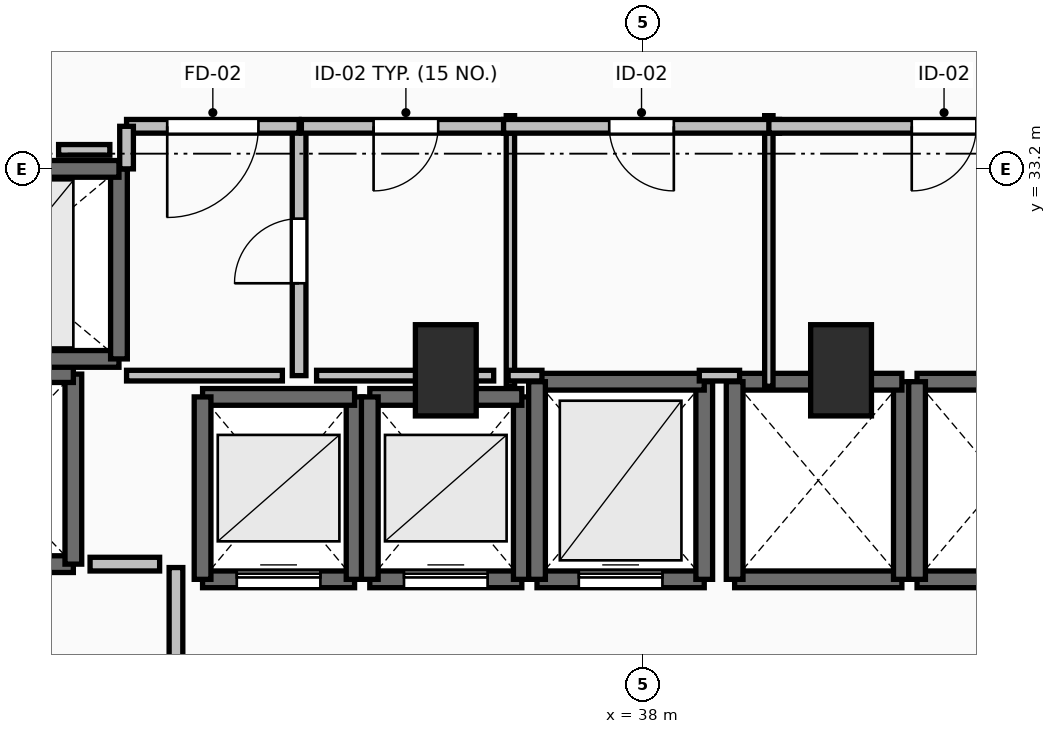
"""IFC4 building model, lengths in metres.
Left out: names, types, materials, properties, quantities, classifications, styles, units other than length and angle.
Written with IfcOpenShell. Run it as: python <this file> out.ifc"""

import sys

from ifc_helpers import new_model, si_unit, direction, frame, frame_2d, origin, origin_2d, place, context, subcontext, project, spatial, rectangle, extrude, element, fill, save


model = new_model("IFC4")
c1 = context("Model", 3, precision=1e-05, world=origin(), true_north=direction((0.0, 1.0)))
c2 = subcontext(c1, "Body", "Model", "MODEL_VIEW")
j1 = project(units=[si_unit("LENGTHUNIT", "METRE"), si_unit("PLANEANGLEUNIT", "RADIAN")], contexts=[c1])
p1 = place(None, origin())
s1 = spatial("IfcSite", under=j1, at=p1, CompositionType="ELEMENT")
p2 = place(p1, origin())
s2 = spatial("IfcBuilding", under=s1, at=p2, CompositionType="ELEMENT")
p3 = place(p2, frame((0.0, 0.0, 106.8)))
s3 = spatial("IfcBuildingStorey", under=s2, at=p3, CompositionType="ELEMENT", Elevation=106.8)
for number, where, z_axis, x_axis in (
    (1, (35.4, 30.55, 0.0), (0.0, 0.0, 1.0), (1.0, 0.0, 0.0)),
    (2, (40.6, 30.55, 0.0), (0.0, 0.0, 1.0), (1.0, 0.0, 0.0)),
):
    element("IfcColumn", number, at=place(p3, frame(where, z_axis=z_axis, x_axis=x_axis)), inside=s3, PredefinedType="PILASTER", context=c2, shape_type="SweptSolid", body=[
        extrude(rectangle(XDim=0.8, YDim=1.2, at=origin_2d()), origin(), (0.0, 0.0, 1.0), 3.5),
    ])
p4 = place(p3, frame((32.2, 27.8, 0.0), z_axis=(0.0, 0.0, 1.0), x_axis=(1.0, 0.0, 0.0)))
e3 = element("IfcWall", 3, at=p4, inside=s3, PredefinedType="SOLIDWALL", context=c2, shape_type="SweptSolid", body=[
    extrude(rectangle(XDim=2.0, YDim=0.22, at=frame_2d((1.0, 0.0))), origin(), (0.0, 0.0, 1.0), 3.24),
])
p5 = place(p4, frame((0.45, 0.0, 0.0)))
e4 = element("IfcOpeningElement", 4, at=p5, cuts=e3, PredefinedType="OPENING", context=c2, shape_type="SweptSolid", body=[
    extrude(rectangle(XDim=1.1, YDim=2.2, at=frame_2d((0.55, 1.1))), frame((0.0, 0.125, 0.0), z_axis=(0.0, -1.0, 0.0), x_axis=(1.0, 0.0, 0.0)), (0.0, 0.0, 1.0), 0.25),
])
p6 = place(p3, frame((34.2, 27.8, 0.0), z_axis=(0.0, 0.0, 1.0), x_axis=(0.0, 1.0, 0.0)))
e5 = element("IfcWall", 5, at=p6, inside=s3, PredefinedType="SOLIDWALL", context=c2, shape_type="SweptSolid", body=[
    extrude(rectangle(XDim=2.4, YDim=0.22, at=frame_2d((1.2, 0.0))), origin(), (0.0, 0.0, 1.0), 3.24),
])
p7 = place(p3, frame((34.2, 30.2, 0.0), z_axis=(0.0, 0.0, 1.0), x_axis=(-1.0, 0.0, 0.0)))
e6 = element("IfcWall", 6, at=p7, inside=s3, PredefinedType="SOLIDWALL", context=c2, shape_type="SweptSolid", body=[
    extrude(rectangle(XDim=2.0, YDim=0.22, at=frame_2d((1.0, 0.0))), origin(), (0.0, 0.0, 1.0), 3.24),
])
p8 = place(p3, frame((32.2, 30.2, 0.0), z_axis=(0.0, 0.0, 1.0), x_axis=(0.0, -1.0, 0.0)))
e7 = element("IfcWall", 7, at=p8, inside=s3, PredefinedType="SOLIDWALL", context=c2, shape_type="SweptSolid", body=[
    extrude(rectangle(XDim=2.4, YDim=0.22, at=frame_2d((1.2, 0.0))), origin(), (0.0, 0.0, 1.0), 3.24),
])
p9 = place(p3, frame((34.4, 27.8, 0.0), z_axis=(0.0, 0.0, 1.0), x_axis=(1.0, 0.0, 0.0)))
e8 = element("IfcWall", 8, at=p9, inside=s3, PredefinedType="SOLIDWALL", context=c2, shape_type="SweptSolid", body=[
    extrude(rectangle(XDim=2.0, YDim=0.22, at=frame_2d((1.0, 0.0))), origin(), (0.0, 0.0, 1.0), 3.24),
])
p10 = place(p9, frame((0.45, 0.0, 0.0)))
e9 = element("IfcOpeningElement", 9, at=p10, cuts=e8, PredefinedType="OPENING", context=c2, shape_type="SweptSolid", body=[
    extrude(rectangle(XDim=1.1, YDim=2.2, at=frame_2d((0.55, 1.1))), frame((0.0, 0.125, 0.0), z_axis=(0.0, -1.0, 0.0), x_axis=(1.0, 0.0, 0.0)), (0.0, 0.0, 1.0), 0.25),
])
p11 = place(p3, frame((36.4, 27.8, 0.0), z_axis=(0.0, 0.0, 1.0), x_axis=(0.0, 1.0, 0.0)))
e10 = element("IfcWall", 10, at=p11, inside=s3, PredefinedType="SOLIDWALL", context=c2, shape_type="SweptSolid", body=[
    extrude(rectangle(XDim=2.4, YDim=0.22, at=frame_2d((1.2, 0.0))), origin(), (0.0, 0.0, 1.0), 3.24),
])
p12 = place(p3, frame((36.4, 30.2, 0.0), z_axis=(0.0, 0.0, 1.0), x_axis=(-1.0, 0.0, 0.0)))
e11 = element("IfcWall", 11, at=p12, inside=s3, PredefinedType="SOLIDWALL", context=c2, shape_type="SweptSolid", body=[
    extrude(rectangle(XDim=2.0, YDim=0.22, at=frame_2d((1.0, 0.0))), origin(), (0.0, 0.0, 1.0), 3.24),
])
p13 = place(p3, frame((34.4, 30.2, 0.0), z_axis=(0.0, 0.0, 1.0), x_axis=(0.0, -1.0, 0.0)))
e12 = element("IfcWall", 12, at=p13, inside=s3, PredefinedType="SOLIDWALL", context=c2, shape_type="SweptSolid", body=[
    extrude(rectangle(XDim=2.4, YDim=0.22, at=frame_2d((1.2, 0.0))), origin(), (0.0, 0.0, 1.0), 3.24),
])
p14 = place(p3, frame((36.6, 27.8, 0.0), z_axis=(0.0, 0.0, 1.0), x_axis=(1.0, 0.0, 0.0)))
e13 = element("IfcWall", 13, at=p14, inside=s3, PredefinedType="SOLIDWALL", context=c2, shape_type="SweptSolid", body=[
    extrude(rectangle(XDim=2.2, YDim=0.22, at=frame_2d((1.1, 0.0))), origin(), (0.0, 0.0, 1.0), 3.24),
])
p15 = place(p14, frame((0.55, 0.0, 0.0)))
e14 = element("IfcOpeningElement", 14, at=p15, cuts=e13, PredefinedType="OPENING", context=c2, shape_type="SweptSolid", body=[
    extrude(rectangle(XDim=1.1, YDim=2.2, at=frame_2d((0.55, 1.1))), frame((0.0, 0.125, 0.0), z_axis=(0.0, -1.0, 0.0), x_axis=(1.0, 0.0, 0.0)), (0.0, 0.0, 1.0), 0.25),
])
p16 = place(p3, frame((38.8, 27.8, 0.0), z_axis=(0.0, 0.0, 1.0), x_axis=(0.0, 1.0, 0.0)))
e15 = element("IfcWall", 15, at=p16, inside=s3, PredefinedType="SOLIDWALL", context=c2, shape_type="SweptSolid", body=[
    extrude(rectangle(XDim=2.6, YDim=0.22, at=frame_2d((1.3, 0.0))), origin(), (0.0, 0.0, 1.0), 3.24),
])
p17 = place(p3, frame((38.8, 30.4, 0.0), z_axis=(0.0, 0.0, 1.0), x_axis=(-1.0, 0.0, 0.0)))
e16 = element("IfcWall", 16, at=p17, inside=s3, PredefinedType="SOLIDWALL", context=c2, shape_type="SweptSolid", body=[
    extrude(rectangle(XDim=2.2, YDim=0.22, at=frame_2d((1.1, 0.0))), origin(), (0.0, 0.0, 1.0), 3.24),
])
p18 = place(p3, frame((36.6, 30.4, 0.0), z_axis=(0.0, 0.0, 1.0), x_axis=(0.0, -1.0, 0.0)))
e17 = element("IfcWall", 17, at=p18, inside=s3, PredefinedType="SOLIDWALL", context=c2, shape_type="SweptSolid", body=[
    extrude(rectangle(XDim=2.6, YDim=0.22, at=frame_2d((1.3, 0.0))), origin(), (0.0, 0.0, 1.0), 3.24),
])
p19 = place(p3, frame((39.2, 27.8, 0.0), z_axis=(0.0, 0.0, 1.0), x_axis=(1.0, 0.0, 0.0)))
e18 = element("IfcWall", 18, at=p19, inside=s3, PredefinedType="SOLIDWALL", context=c2, shape_type="SweptSolid", body=[
    extrude(rectangle(XDim=2.2, YDim=0.22, at=frame_2d((1.1, 0.0))), origin(), (0.0, 0.0, 1.0), 3.24),
])
p20 = place(p3, frame((41.4, 27.8, 0.0), z_axis=(0.0, 0.0, 1.0), x_axis=(0.0, 1.0, 0.0)))
e19 = element("IfcWall", 19, at=p20, inside=s3, PredefinedType="SOLIDWALL", context=c2, shape_type="SweptSolid", body=[
    extrude(rectangle(XDim=2.6, YDim=0.22, at=frame_2d((1.3, 0.0))), origin(), (0.0, 0.0, 1.0), 3.24),
])
p21 = place(p3, frame((41.4, 30.4, 0.0), z_axis=(0.0, 0.0, 1.0), x_axis=(-1.0, 0.0, 0.0)))
e20 = element("IfcWall", 20, at=p21, inside=s3, PredefinedType="SOLIDWALL", context=c2, shape_type="SweptSolid", body=[
    extrude(rectangle(XDim=2.2, YDim=0.22, at=frame_2d((1.1, 0.0))), origin(), (0.0, 0.0, 1.0), 3.24),
])
p22 = place(p3, frame((39.2, 30.4, 0.0), z_axis=(0.0, 0.0, 1.0), x_axis=(0.0, -1.0, 0.0)))
e21 = element("IfcWall", 21, at=p22, inside=s3, PredefinedType="SOLIDWALL", context=c2, shape_type="SweptSolid", body=[
    extrude(rectangle(XDim=2.6, YDim=0.22, at=frame_2d((1.3, 0.0))), origin(), (0.0, 0.0, 1.0), 3.24),
])
for number, where, z_axis, x_axis in (
    (22, (41.6, 27.8, 0.0), (0.0, 0.0, 1.0), (1.0, 0.0, 0.0)),
    (23, (43.8, 30.4, 0.0), (0.0, 0.0, 1.0), (-1.0, 0.0, 0.0)),
):
    element("IfcWall", number, at=place(p3, frame(where, z_axis=z_axis, x_axis=x_axis)), inside=s3, PredefinedType="SOLIDWALL", context=c2, shape_type="SweptSolid", body=[
        extrude(rectangle(XDim=2.2, YDim=0.22, at=frame_2d((1.1, 0.0))), origin(), (0.0, 0.0, 1.0), 3.24),
    ])
p23 = place(p3, frame((41.6, 30.4, 0.0), z_axis=(0.0, 0.0, 1.0), x_axis=(0.0, -1.0, 0.0)))
e24 = element("IfcWall", 24, at=p23, inside=s3, PredefinedType="SOLIDWALL", context=c2, shape_type="SweptSolid", body=[
    extrude(rectangle(XDim=2.6, YDim=0.22, at=frame_2d((1.3, 0.0))), origin(), (0.0, 0.0, 1.0), 3.24),
])
p24 = place(p3, frame((28.1, 28.0, 0.0), z_axis=(0.0, 0.0, 1.0), x_axis=(1.0, 0.0, 0.0)))
e25 = element("IfcWall", 25, at=p24, inside=s3, PredefinedType="SHEAR", context=c2, shape_type="SweptSolid", body=[
    extrude(rectangle(XDim=2.4, YDim=0.22, at=frame_2d((1.2, 0.0))), origin(), (0.0, 0.0, 1.0), 3.24),
])
p25 = place(p24, frame((0.6, 0.0, 0.0)))
e26 = element("IfcOpeningElement", 26, at=p25, cuts=e25, PredefinedType="OPENING", context=c2, shape_type="SweptSolid", body=[
    extrude(rectangle(XDim=1.2, YDim=2.2, at=frame_2d((0.6, 1.1))), frame((0.0, 0.125, 0.0), z_axis=(0.0, -1.0, 0.0), x_axis=(1.0, 0.0, 0.0)), (0.0, 0.0, 1.0), 0.25),
])
p26 = place(p3, frame((30.5, 28.0, 0.0), z_axis=(0.0, 0.0, 1.0), x_axis=(0.0, 1.0, 0.0)))
e27 = element("IfcWall", 27, at=p26, inside=s3, PredefinedType="SHEAR", context=c2, shape_type="SweptSolid", body=[
    extrude(rectangle(XDim=2.5, YDim=0.22, at=frame_2d((1.25, 0.0))), origin(), (0.0, 0.0, 1.0), 3.24),
])
p27 = place(p3, frame((30.5, 30.5, 0.0), z_axis=(0.0, 0.0, 1.0), x_axis=(-1.0, 0.0, 0.0)))
e28 = element("IfcWall", 28, at=p27, inside=s3, PredefinedType="SHEAR", context=c2, shape_type="SweptSolid", body=[
    extrude(rectangle(XDim=2.4, YDim=0.22, at=frame_2d((1.2, 0.0))), origin(), (0.0, 0.0, 1.0), 3.24),
])
p28 = place(p3, frame((28.1, 30.7, 0.0), z_axis=(0.0, 0.0, 1.0), x_axis=(1.0, 0.0, 0.0)))
e29 = element("IfcWall", 29, at=p28, inside=s3, PredefinedType="SOLIDWALL", context=c2, shape_type="SweptSolid", body=[
    extrude(rectangle(XDim=3.0, YDim=0.22, at=frame_2d((1.5, 0.0))), origin(), (0.0, 0.0, 1.0), 3.24),
])
p29 = place(p3, frame((31.1, 30.7, 0.0), z_axis=(0.0, 0.0, 1.0), x_axis=(0.0, 1.0, 0.0)))
e30 = element("IfcWall", 30, at=p29, inside=s3, PredefinedType="SOLIDWALL", context=c2, shape_type="SweptSolid", body=[
    extrude(rectangle(XDim=2.5, YDim=0.22, at=frame_2d((1.25, 0.0))), origin(), (0.0, 0.0, 1.0), 3.24),
])
p30 = place(p3, frame((31.1, 33.2, 0.0), z_axis=(0.0, 0.0, 1.0), x_axis=(-1.0, 0.0, 0.0)))
e31 = element("IfcWall", 31, at=p30, inside=s3, PredefinedType="SOLIDWALL", context=c2, shape_type="SweptSolid", body=[
    extrude(rectangle(XDim=3.0, YDim=0.22, at=frame_2d((1.5, 0.0))), origin(), (0.0, 0.0, 1.0), 3.24),
])
p31 = place(p30, frame((0.9, 0.0, 0.0)))
e32 = element("IfcOpeningElement", 32, at=p31, cuts=e31, PredefinedType="OPENING", context=c2, shape_type="SweptSolid", body=[
    extrude(rectangle(XDim=1.2, YDim=2.2, at=frame_2d((0.6, 1.1))), frame((0.0, 0.125, 0.0), z_axis=(0.0, -1.0, 0.0), x_axis=(1.0, 0.0, 0.0)), (0.0, 0.0, 1.0), 0.25),
])
p32 = place(p3, frame((31.85, 24.045, 0.0), z_axis=(0.0, 0.0, 1.0), x_axis=(0.0, 1.0, 0.0)))
e33 = element("IfcWall", 33, at=p32, inside=s3, PredefinedType="PARTITIONING", context=c2, shape_type="SweptSolid", body=[
    extrude(rectangle(XDim=3.91, YDim=0.18, at=frame_2d((1.955, 0.0))), origin(), (0.0, 0.0, 1.0), 3.24),
])
p33 = place(p32, frame((1.355, 0.0, 0.0)))
e34 = element("IfcOpeningElement", 34, at=p33, cuts=e33, PredefinedType="OPENING", context=c2, shape_type="SweptSolid", body=[
    extrude(rectangle(XDim=1.2, YDim=2.15, at=frame_2d((0.6, 1.075))), frame((0.0, 0.105, 0.0), z_axis=(0.0, -1.0, 0.0), x_axis=(1.0, 0.0, 0.0)), (0.0, 0.0, 1.0), 0.21),
])
p34 = place(p3, frame((33.47, 30.48, 0.0), z_axis=(0.0, 0.0, 1.0), x_axis=(0.0, 1.0, 0.0)))
e35 = element("IfcWall", 35, at=p34, inside=s3, PredefinedType="PARTITIONING", context=c2, shape_type="SweptSolid", body=[
    extrude(rectangle(XDim=3.28, YDim=0.18, at=frame_2d((1.64, 0.0))), origin(), (0.0, 0.0, 1.0), 3.24),
])
p35 = place(p34, frame((1.215, 0.0, 0.0)))
e36 = element("IfcOpeningElement", 36, at=p35, cuts=e35, PredefinedType="OPENING", context=c2, shape_type="SweptSolid", body=[
    extrude(rectangle(XDim=0.85, YDim=2.1, at=frame_2d((0.425, 1.05))), frame((0.0, 0.105, 0.0), z_axis=(0.0, -1.0, 0.0), x_axis=(1.0, 0.0, 0.0)), (0.0, 0.0, 1.0), 0.21),
])
p36 = place(p3, frame((33.47, 33.76, 0.0), z_axis=(0.0, 0.0, 1.0), x_axis=(-1.0, 0.0, 0.0)))
e37 = element("IfcWall", 37, at=p36, inside=s3, PredefinedType="PARTITIONING", context=c2, shape_type="SweptSolid", body=[
    extrude(rectangle(XDim=2.27, YDim=0.18, at=frame_2d((1.135, 0.0))), origin(), (0.0, 0.0, 1.0), 3.24),
])
p37 = place(p36, frame((0.535, 0.0, 0.0)))
e38 = element("IfcOpeningElement", 38, at=p37, cuts=e37, PredefinedType="OPENING", context=c2, shape_type="SweptSolid", body=[
    extrude(rectangle(XDim=1.2, YDim=2.15, at=frame_2d((0.6, 1.075))), frame((0.0, 0.105, 0.0), z_axis=(0.0, -1.0, 0.0), x_axis=(1.0, 0.0, 0.0)), (0.0, 0.0, 1.0), 0.21),
])
p38 = place(p3, frame((31.2, 33.76, 0.0), z_axis=(0.0, 0.0, 1.0), x_axis=(0.0, -1.0, 0.0)))
e39 = element("IfcWall", 39, at=p38, inside=s3, PredefinedType="PARTITIONING", context=c2, shape_type="SweptSolid", body=[
    extrude(rectangle(XDim=0.56, YDim=0.18, at=frame_2d((0.28, 0.0))), origin(), (0.0, 0.0, 1.0), 3.24),
])
p39 = place(p3, frame((36.25, 30.34, 0.0), z_axis=(0.0, 0.0, 1.0), x_axis=(0.0, 1.0, 0.0)))
e40 = element("IfcWall", 40, at=p39, inside=s3, PredefinedType="PARTITIONING", context=c2, shape_type="SweptSolid", body=[
    extrude(rectangle(XDim=3.56, YDim=0.11, at=frame_2d((1.78, 0.0))), origin(), (0.0, 0.0, 1.0), 2.432),
])
p40 = place(p3, frame((36.25, 33.76, 0.0), z_axis=(0.0, 0.0, 1.0), x_axis=(-1.0, 0.0, 0.0)))
e41 = element("IfcWall", 41, at=p40, inside=s3, PredefinedType="PARTITIONING", context=c2, shape_type="SweptSolid", body=[
    extrude(rectangle(XDim=2.75, YDim=0.18, at=frame_2d((1.375, 0.0))), origin(), (0.0, 0.0, 1.0), 3.24),
])
p41 = place(p40, frame((0.95, 0.0, 0.0)))
e42 = element("IfcOpeningElement", 42, at=p41, cuts=e41, PredefinedType="OPENING", context=c2, shape_type="SweptSolid", body=[
    extrude(rectangle(XDim=0.85, YDim=2.1, at=frame_2d((0.425, 1.05))), frame((0.0, 0.105, 0.0), z_axis=(0.0, -1.0, 0.0), x_axis=(1.0, 0.0, 0.0)), (0.0, 0.0, 1.0), 0.21),
])
p42 = place(p3, frame((39.65, 30.34, 0.0), z_axis=(0.0, 0.0, 1.0), x_axis=(0.0, 1.0, 0.0)))
e43 = element("IfcWall", 43, at=p42, inside=s3, PredefinedType="PARTITIONING", context=c2, shape_type="SweptSolid", body=[
    extrude(rectangle(XDim=3.56, YDim=0.11, at=frame_2d((1.78, 0.0))), origin(), (0.0, 0.0, 1.0), 2.432),
])
p43 = place(p3, frame((39.79, 33.76, 0.0), z_axis=(0.0, 0.0, 1.0), x_axis=(-1.0, 0.0, 0.0)))
e44 = element("IfcWall", 44, at=p43, inside=s3, PredefinedType="PARTITIONING", context=c2, shape_type="SweptSolid", body=[
    extrude(rectangle(XDim=3.63, YDim=0.18, at=frame_2d((1.815, 0.0))), origin(), (0.0, 0.0, 1.0), 3.24),
])
p44 = place(p43, frame((1.39, 0.0, 0.0)))
e45 = element("IfcOpeningElement", 45, at=p44, cuts=e44, PredefinedType="OPENING", context=c2, shape_type="SweptSolid", body=[
    extrude(rectangle(XDim=0.85, YDim=2.1, at=frame_2d((0.425, 1.05))), frame((0.0, 0.105, 0.0), z_axis=(0.0, -1.0, 0.0), x_axis=(1.0, 0.0, 0.0)), (0.0, 0.0, 1.0), 0.21),
])
p45 = place(p3, frame((44.26, 33.76, 0.0), z_axis=(0.0, 0.0, 1.0), x_axis=(-1.0, 0.0, 0.0)))
e46 = element("IfcWall", 46, at=p45, inside=s3, PredefinedType="PARTITIONING", context=c2, shape_type="SweptSolid", body=[
    extrude(rectangle(XDim=4.61, YDim=0.18, at=frame_2d((2.305, 0.0))), origin(), (0.0, 0.0, 1.0), 3.24),
])
p46 = place(p45, frame((1.88, 0.0, 0.0)))
e47 = element("IfcOpeningElement", 47, at=p46, cuts=e46, PredefinedType="OPENING", context=c2, shape_type="SweptSolid", body=[
    extrude(rectangle(XDim=0.85, YDim=2.1, at=frame_2d((0.425, 1.05))), frame((0.0, 0.105, 0.0), z_axis=(0.0, -1.0, 0.0), x_axis=(1.0, 0.0, 0.0)), (0.0, 0.0, 1.0), 0.21),
])
p47 = place(p3, frame((31.635, 28.0, 0.0), z_axis=(0.0, 0.0, 1.0), x_axis=(-1.0, 0.0, 0.0)))
e48 = element("IfcWall", 48, at=p47, inside=s3, PredefinedType="PARTITIONING", context=c2, shape_type="SweptSolid", body=[
    extrude(rectangle(XDim=0.915, YDim=0.18, at=frame_2d((0.458, 0.0))), origin(), (0.0, 0.0, 1.0), 3.24),
])
p48 = place(p3, frame((31.2, 30.48, 0.0), z_axis=(0.0, 0.0, 1.0), x_axis=(1.0, 0.0, 0.0)))
e49 = element("IfcWall", 49, at=p48, inside=s3, PredefinedType="PARTITIONING", context=c2, shape_type="SweptSolid", body=[
    extrude(rectangle(XDim=2.05, YDim=0.14, at=frame_2d((1.025, 0.0))), origin(), (0.0, 0.0, 1.0), 3.24),
])
p49 = place(p3, frame((33.7, 30.48, 0.0), z_axis=(0.0, 0.0, 1.0), x_axis=(1.0, 0.0, 0.0)))
e50 = element("IfcWall", 50, at=p49, inside=s3, PredefinedType="PARTITIONING", context=c2, shape_type="SweptSolid", body=[
    extrude(rectangle(XDim=2.33, YDim=0.14, at=frame_2d((1.165, 0.0))), origin(), (0.0, 0.0, 1.0), 2.432),
])
p50 = place(p3, frame((36.22, 30.48, 0.0), z_axis=(0.0, 0.0, 1.0), x_axis=(1.0, 0.0, 0.0)))
e51 = element("IfcWall", 51, at=p50, inside=s3, PredefinedType="PARTITIONING", context=c2, shape_type="SweptSolid", body=[
    extrude(rectangle(XDim=0.445, YDim=0.14, at=frame_2d((0.223, 0.0))), origin(), (0.0, 0.0, 1.0), 2.432),
])
p51 = place(p3, frame((38.735, 30.48, 0.0), z_axis=(0.0, 0.0, 1.0), x_axis=(1.0, 0.0, 0.0)))
e52 = element("IfcWall", 52, at=p51, inside=s3, PredefinedType="PARTITIONING", context=c2, shape_type="SweptSolid", body=[
    extrude(rectangle(XDim=0.53, YDim=0.14, at=frame_2d((0.265, 0.0))), origin(), (0.0, 0.0, 1.0), 2.432),
])
p52 = place(p3, frame((30.306, 33.45, 0.0), z_axis=(0.0, 0.0, 1.0), x_axis=(1.0, 0.0, 0.0)))
e53 = element("IfcWall", 53, at=p52, inside=s3, PredefinedType="PARTITIONING", context=c2, shape_type="SweptSolid", body=[
    extrude(rectangle(XDim=0.674, YDim=0.14, at=frame_2d((0.337, 0.0))), origin(), (0.0, 0.0, 1.0), 3.24),
])
p53 = place(p5, origin())
e54 = element("IfcDoor", 54, at=p53, inside=s3, OperationType="SLIDING_TO_LEFT", PredefinedType="DOOR", context=c2, shape_type="SweptSolid", body=[
    extrude(rectangle(XDim=1.1, YDim=2.2, at=frame_2d((0.55, 1.1))), frame((0.0, 0.025, 0.0), z_axis=(0.0, -1.0, 0.0), x_axis=(1.0, 0.0, 0.0)), (0.0, 0.0, 1.0), 0.05),
])
fill(e4, e54)
p54 = place(p10, origin())
e55 = element("IfcDoor", 55, at=p54, inside=s3, OperationType="SLIDING_TO_LEFT", PredefinedType="DOOR", context=c2, shape_type="SweptSolid", body=[
    extrude(rectangle(XDim=1.1, YDim=2.2, at=frame_2d((0.55, 1.1))), frame((0.0, 0.025, 0.0), z_axis=(0.0, -1.0, 0.0), x_axis=(1.0, 0.0, 0.0)), (0.0, 0.0, 1.0), 0.05),
])
fill(e9, e55)
p55 = place(p15, origin())
e56 = element("IfcDoor", 56, at=p55, inside=s3, OperationType="SLIDING_TO_LEFT", PredefinedType="DOOR", context=c2, shape_type="SweptSolid", body=[
    extrude(rectangle(XDim=1.1, YDim=2.2, at=frame_2d((0.55, 1.1))), frame((0.0, 0.025, 0.0), z_axis=(0.0, -1.0, 0.0), x_axis=(1.0, 0.0, 0.0)), (0.0, 0.0, 1.0), 0.05),
])
fill(e14, e56)
p56 = place(p35, origin())
e57 = element("IfcDoor", 57, at=p56, inside=s3, OperationType="SINGLE_SWING_LEFT", PredefinedType="DOOR", context=c2, shape_type="SweptSolid", body=[
    extrude(rectangle(XDim=0.85, YDim=2.1, at=frame_2d((0.425, 1.05))), frame((0.0, 0.025, 0.0), z_axis=(0.0, -1.0, 0.0), x_axis=(1.0, 0.0, 0.0)), (0.0, 0.0, 1.0), 0.05),
])
fill(e36, e57)
p57 = place(p37, origin())
e58 = element("IfcDoor", 58, at=p57, inside=s3, OperationType="SINGLE_SWING_RIGHT", PredefinedType="DOOR", context=c2, shape_type="SweptSolid", body=[
    extrude(rectangle(XDim=1.2, YDim=2.15, at=frame_2d((0.6, 1.075))), frame((0.0, 0.025, 0.0), z_axis=(0.0, -1.0, 0.0), x_axis=(1.0, 0.0, 0.0)), (0.0, 0.0, 1.0), 0.05),
])
fill(e38, e58)
p58 = place(p41, origin())
e59 = element("IfcDoor", 59, at=p58, inside=s3, OperationType="SINGLE_SWING_RIGHT", PredefinedType="DOOR", context=c2, shape_type="SweptSolid", body=[
    extrude(rectangle(XDim=0.85, YDim=2.1, at=frame_2d((0.425, 1.05))), frame((0.0, 0.025, 0.0), z_axis=(0.0, -1.0, 0.0), x_axis=(1.0, 0.0, 0.0)), (0.0, 0.0, 1.0), 0.05),
])
fill(e42, e59)
p59 = place(p44, origin())
e60 = element("IfcDoor", 60, at=p59, inside=s3, OperationType="SINGLE_SWING_LEFT", PredefinedType="DOOR", context=c2, shape_type="SweptSolid", body=[
    extrude(rectangle(XDim=0.85, YDim=2.1, at=frame_2d((0.425, 1.05))), frame((0.0, 0.025, 0.0), z_axis=(0.0, -1.0, 0.0), x_axis=(1.0, 0.0, 0.0)), (0.0, 0.0, 1.0), 0.05),
])
fill(e45, e60)
p60 = place(p46, origin())
e61 = element("IfcDoor", 61, at=p60, inside=s3, OperationType="SINGLE_SWING_RIGHT", PredefinedType="DOOR", context=c2, shape_type="SweptSolid", body=[
    extrude(rectangle(XDim=0.85, YDim=2.1, at=frame_2d((0.425, 1.05))), frame((0.0, 0.025, 0.0), z_axis=(0.0, -1.0, 0.0), x_axis=(1.0, 0.0, 0.0)), (0.0, 0.0, 1.0), 0.05),
])
fill(e47, e61)
save(model, sys.argv[1])
